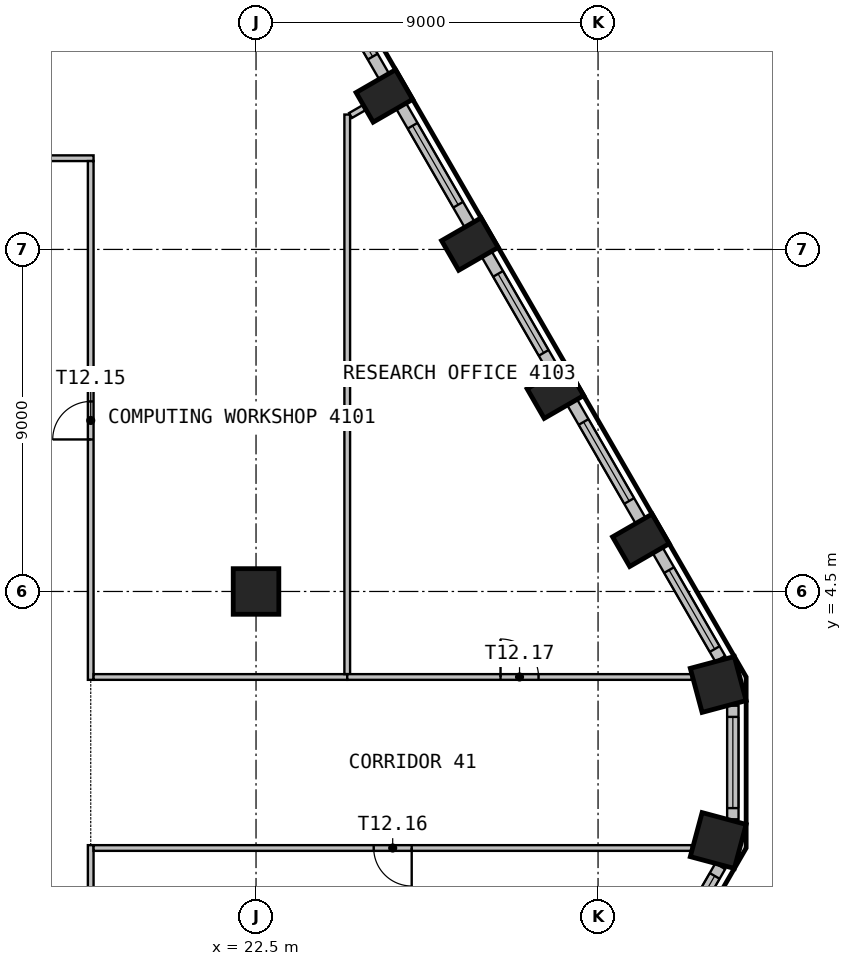
"""IFC4 building model, lengths in metres.
Left out: names, types, materials, properties, quantities, classifications, styles, units other than length and angle.
Written with IfcOpenShell. Run it as: python <this file> out.ifc"""

import sys

from ifc_helpers import new_model, si_unit, direction, frame, frame_2d, origin, origin_2d, place, context, subcontext, project, spatial, rectangle, circle, extrude, element, fill, save


model = new_model("IFC4")
c1 = context("Model", 3, precision=1e-05, world=origin(), true_north=direction((0.0, 1.0)))
c2 = subcontext(c1, "Body", "Model", "MODEL_VIEW")
j1 = project(units=[si_unit("LENGTHUNIT", "METRE"), si_unit("PLANEANGLEUNIT", "RADIAN")], contexts=[c1])
p1 = place(None, origin())
s1 = spatial("IfcSite", under=j1, at=p1, CompositionType="ELEMENT")
p2 = place(p1, origin())
s2 = spatial("IfcBuilding", under=s1, at=p2, CompositionType="ELEMENT")
p3 = place(p2, frame((0.0, 0.0, 167.7)))
s3 = spatial("IfcBuildingStorey", under=s2, at=p3, CompositionType="ELEMENT", Elevation=167.7)
for number, where, z_axis, x_axis in (
    (1, (34.662, -2.053, 0.0), (0.0, 0.0, 1.0), (0.259, 0.966, 0.0)),
    (2, (34.662, 2.053, 0.0), (0.0, 0.0, 1.0), (-0.259, 0.966, 0.0)),
):
    element("IfcColumn", number, at=place(p3, frame(where, z_axis=z_axis, x_axis=x_axis)), inside=s3, PredefinedType="COLUMN", context=c2, shape_type="SweptSolid", body=[
        extrude(rectangle(XDim=1.2, YDim=1.2, at=origin_2d()), origin(), (0.0, 0.0, 1.0), 3.575),
    ])
for number, where, z_axis, x_axis in (
    (3, (32.627, 5.847, 0.0), (0.0, 0.0, 1.0), (-0.5, 0.866, 0.0)),
    (4, (30.377, 9.744, 0.0), (0.0, 0.0, 1.0), (-0.5, 0.866, 0.0)),
    (5, (28.127, 13.641, 0.0), (0.0, 0.0, 1.0), (-0.5, 0.866, 0.0)),
    (6, (25.877, 17.539, 0.0), (0.0, 0.0, 1.0), (-0.5, 0.866, 0.0)),
):
    element("IfcColumn", number, at=place(p3, frame(where, z_axis=z_axis, x_axis=x_axis)), inside=s3, PredefinedType="COLUMN", context=c2, shape_type="SweptSolid", body=[
        extrude(rectangle(XDim=0.9, YDim=1.2, at=origin_2d()), origin(), (0.0, 0.0, 1.0), 3.575),
    ])
p4 = place(p3, frame((22.5, 4.5, 0.0), z_axis=(0.0, 0.0, 1.0), x_axis=(1.0, 0.0, 0.0)))
e7 = element("IfcColumn", 7, at=p4, inside=s3, PredefinedType="COLUMN", context=c2, shape_type="SweptSolid", body=[
    extrude(circle(Radius=0.6, at=origin_2d()), origin(), (0.0, 0.0, 1.0), 3.575),
])
p5 = place(p3, frame((33.069, -5.582, 0.0), z_axis=(0.0, 0.0, 1.0), x_axis=(0.499981217486, 0.866036247602, 0.0)))
e8 = element("IfcWall", 8, at=p5, inside=s3, PredefinedType="SOLIDWALL", context=c2, shape_type="SweptSolid", body=[
    extrude(rectangle(XDim=3.294, YDim=0.3, at=frame_2d((1.647, 0.0))), origin(), (0.0, 0.0, 1.0), 3.575),
])
p6 = place(p5, frame((0.6, 0.0, 0.9)))
e9 = element("IfcOpeningElement", 9, at=p6, cuts=e8, PredefinedType="OPENING", context=c2, shape_type="SweptSolid", body=[
    extrude(rectangle(XDim=2.4, YDim=2.1, at=frame_2d((1.2, 1.05))), frame((0.0, 0.16, 0.0), z_axis=(0.0, -1.0, 0.0), x_axis=(1.0, 0.0, 0.0)), (0.0, 0.0, 1.0), 0.32),
])
p7 = place(p3, frame((35.047, -1.495, 0.0), z_axis=(0.0, 0.0, 1.0), x_axis=(0.0, 1.0, 0.0)))
e10 = element("IfcWall", 10, at=p7, inside=s3, PredefinedType="SOLIDWALL", context=c2, shape_type="SweptSolid", body=[
    extrude(rectangle(XDim=2.989, YDim=0.3, at=frame_2d((1.495, 0.0))), origin(), (0.0, 0.0, 1.0), 3.575),
])
p8 = place(p7, frame((0.295, 0.0, 0.9)))
e11 = element("IfcOpeningElement", 11, at=p8, cuts=e10, PredefinedType="OPENING", context=c2, shape_type="SweptSolid", body=[
    extrude(rectangle(XDim=2.4, YDim=2.1, at=frame_2d((1.2, 1.05))), frame((0.0, 0.16, 0.0), z_axis=(0.0, -1.0, 0.0), x_axis=(1.0, 0.0, 0.0)), (0.0, 0.0, 1.0), 0.32),
])
p9 = place(p3, frame((34.716, 2.729, 0.0), z_axis=(0.0, 0.0, 1.0), x_axis=(-0.499981217486, 0.866036247602, 0.0)))
e12 = element("IfcWall", 12, at=p9, inside=s3, PredefinedType="SOLIDWALL", context=c2, shape_type="SweptSolid", body=[
    extrude(rectangle(XDim=3.294, YDim=0.3, at=frame_2d((1.647, 0.0))), origin(), (0.0, 0.0, 1.0), 3.575),
])
p10 = place(p9, frame((0.295, 0.0, 0.9)))
e13 = element("IfcOpeningElement", 13, at=p10, cuts=e12, PredefinedType="OPENING", context=c2, shape_type="SweptSolid", body=[
    extrude(rectangle(XDim=2.4, YDim=2.1, at=frame_2d((1.2, 1.05))), frame((0.0, 0.16, 0.0), z_axis=(0.0, -1.0, 0.0), x_axis=(1.0, 0.0, 0.0)), (0.0, 0.0, 1.0), 0.32),
])
p11 = place(p3, frame((32.619, 6.362, 0.0), z_axis=(0.0, 0.0, 1.0), x_axis=(-0.500027802648, 0.866009351323, 0.0)))
e14 = element("IfcWall", 14, at=p11, inside=s3, PredefinedType="SOLIDWALL", context=c2, shape_type="SweptSolid", body=[
    extrude(rectangle(XDim=3.599, YDim=0.3, at=frame_2d((1.799, 0.0))), origin(), (0.0, 0.0, 1.0), 3.575),
])
p12 = place(p11, frame((0.6, 0.0, 0.9)))
e15 = element("IfcOpeningElement", 15, at=p12, cuts=e14, PredefinedType="OPENING", context=c2, shape_type="SweptSolid", body=[
    extrude(rectangle(XDim=2.4, YDim=2.1, at=frame_2d((1.2, 1.05))), frame((0.0, 0.16, 0.0), z_axis=(0.0, -1.0, 0.0), x_axis=(1.0, 0.0, 0.0)), (0.0, 0.0, 1.0), 0.32),
])
p13 = place(p3, frame((30.369, 10.26, 0.0), z_axis=(0.0, 0.0, 1.0), x_axis=(-0.500027802648, 0.866009351323, 0.0)))
e16 = element("IfcWall", 16, at=p13, inside=s3, PredefinedType="SOLIDWALL", context=c2, shape_type="SweptSolid", body=[
    extrude(rectangle(XDim=3.599, YDim=0.3, at=frame_2d((1.799, 0.0))), origin(), (0.0, 0.0, 1.0), 3.575),
])
p14 = place(p13, frame((0.6, 0.0, 0.9)))
e17 = element("IfcOpeningElement", 17, at=p14, cuts=e16, PredefinedType="OPENING", context=c2, shape_type="SweptSolid", body=[
    extrude(rectangle(XDim=2.4, YDim=2.1, at=frame_2d((1.2, 1.05))), frame((0.0, 0.16, 0.0), z_axis=(0.0, -1.0, 0.0), x_axis=(1.0, 0.0, 0.0)), (0.0, 0.0, 1.0), 0.32),
])
p15 = place(p3, frame((28.119, 14.156, 0.0), z_axis=(0.0, 0.0, 1.0), x_axis=(-0.500027802648, 0.866009351323, 0.0)))
e18 = element("IfcWall", 18, at=p15, inside=s3, PredefinedType="SOLIDWALL", context=c2, shape_type="SweptSolid", body=[
    extrude(rectangle(XDim=3.599, YDim=0.3, at=frame_2d((1.799, 0.0))), origin(), (0.0, 0.0, 1.0), 3.575),
])
p16 = place(p15, frame((0.6, 0.0, 0.9)))
e19 = element("IfcOpeningElement", 19, at=p16, cuts=e18, PredefinedType="OPENING", context=c2, shape_type="SweptSolid", body=[
    extrude(rectangle(XDim=2.4, YDim=2.1, at=frame_2d((1.2, 1.05))), frame((0.0, 0.16, 0.0), z_axis=(0.0, -1.0, 0.0), x_axis=(1.0, 0.0, 0.0)), (0.0, 0.0, 1.0), 0.32),
])
p17 = place(p3, frame((25.869, 18.054, 0.0), z_axis=(0.0, 0.0, 1.0), x_axis=(-0.500027802648, 0.866009351323, 0.0)))
e20 = element("IfcWall", 20, at=p17, inside=s3, PredefinedType="SOLIDWALL", context=c2, shape_type="SweptSolid", body=[
    extrude(rectangle(XDim=3.599, YDim=0.3, at=frame_2d((1.799, 0.0))), origin(), (0.0, 0.0, 1.0), 3.575),
])
p18 = place(p17, frame((0.6, 0.0, 0.9)))
e21 = element("IfcOpeningElement", 21, at=p18, cuts=e20, PredefinedType="OPENING", context=c2, shape_type="SweptSolid", body=[
    extrude(rectangle(XDim=2.4, YDim=2.1, at=frame_2d((1.2, 1.05))), frame((0.0, 0.16, 0.0), z_axis=(0.0, -1.0, 0.0), x_axis=(1.0, 0.0, 0.0)), (0.0, 0.0, 1.0), 0.32),
])
p19 = place(p3, frame((18.225, 15.9, 0.0), z_axis=(0.0, 0.0, 1.0), x_axis=(-1.0, 0.0, 0.0)))
e22 = element("IfcWall", 22, at=p19, inside=s3, PredefinedType="PARTITIONING", context=c2, shape_type="SweptSolid", body=[
    extrude(rectangle(XDim=4.725, YDim=0.15, at=frame_2d((2.363, 0.0))), origin(), (0.0, 0.0, 1.0), 3.575),
])
p20 = place(p3, frame((18.15, -15.825, 0.0), z_axis=(0.0, 0.0, 1.0), x_axis=(0.0, 1.0, 0.0)))
e23 = element("IfcWall", 23, at=p20, inside=s3, PredefinedType="PARTITIONING", context=c2, shape_type="SweptSolid", body=[
    extrude(rectangle(XDim=13.65, YDim=0.15, at=frame_2d((6.825, 0.0))), origin(), (0.0, 0.0, 1.0), 3.575),
])
p21 = place(p3, frame((33.968, -2.25, 0.0), z_axis=(0.0, 0.0, 1.0), x_axis=(-1.0, 0.0, 0.0)))
e24 = element("IfcWall", 24, at=p21, inside=s3, PredefinedType="PARTITIONING", context=c2, shape_type="SweptSolid", body=[
    extrude(rectangle(XDim=15.743, YDim=0.15, at=frame_2d((7.871, 0.0))), origin(), (0.0, 0.0, 1.0), 3.575),
])
p22 = place(p21, frame((7.371, 0.0, 0.0)))
e25 = element("IfcOpeningElement", 25, at=p22, cuts=e24, PredefinedType="OPENING", context=c2, shape_type="SweptSolid", body=[
    extrude(rectangle(XDim=1.0, YDim=2.1, at=frame_2d((0.5, 1.05))), frame((0.0, 0.085, 0.0), z_axis=(0.0, -1.0, 0.0), x_axis=(1.0, 0.0, 0.0)), (0.0, 0.0, 1.0), 0.17),
])
p23 = place(p3, frame((18.15, 2.175, 0.0), z_axis=(0.0, 0.0, 1.0), x_axis=(0.0, 1.0, 0.0)))
e26 = element("IfcWall", 26, at=p23, inside=s3, PredefinedType="PARTITIONING", context=c2, shape_type="SweptSolid", body=[
    extrude(rectangle(XDim=13.65, YDim=0.15, at=frame_2d((6.825, 0.0))), origin(), (0.0, 0.0, 1.0), 3.575),
])
p24 = place(p23, frame((6.325, 0.0, 0.0)))
e27 = element("IfcOpeningElement", 27, at=p24, cuts=e26, PredefinedType="OPENING", context=c2, shape_type="SweptSolid", body=[
    extrude(rectangle(XDim=1.0, YDim=2.1, at=frame_2d((0.5, 1.05))), frame((0.0, 0.085, 0.0), z_axis=(0.0, -1.0, 0.0), x_axis=(1.0, 0.0, 0.0)), (0.0, 0.0, 1.0), 0.17),
])
p25 = place(p3, frame((18.225, 2.25, 0.0), z_axis=(0.0, 0.0, 1.0), x_axis=(1.0, 0.0, 0.0)))
e28 = element("IfcWall", 28, at=p25, inside=s3, PredefinedType="PARTITIONING", context=c2, shape_type="SweptSolid", body=[
    extrude(rectangle(XDim=6.675, YDim=0.15, at=frame_2d((3.337, 0.0))), origin(), (0.0, 0.0, 1.0), 3.575),
])
p26 = place(p3, frame((24.9, 17.049, 0.0), z_axis=(0.0, 0.0, 1.0), x_axis=(0.0, -1.0, 0.0)))
e29 = element("IfcWall", 29, at=p26, inside=s3, PredefinedType="PARTITIONING", context=c2, shape_type="SweptSolid", body=[
    extrude(rectangle(XDim=14.724, YDim=0.15, at=frame_2d((7.362, 0.0))), origin(), (0.0, 0.0, 1.0), 3.575),
])
p27 = place(p3, frame((24.9, 2.25, 0.0), z_axis=(0.0, 0.0, 1.0), x_axis=(1.0, 0.0, 0.0)))
e30 = element("IfcWall", 30, at=p27, inside=s3, PredefinedType="PARTITIONING", context=c2, shape_type="SweptSolid", body=[
    extrude(rectangle(XDim=9.068, YDim=0.15, at=frame_2d((4.534, 0.0))), origin(), (0.0, 0.0, 1.0), 3.575),
])
p28 = place(p27, frame((4.034, 0.0, 0.0)))
e31 = element("IfcOpeningElement", 31, at=p28, cuts=e30, PredefinedType="OPENING", context=c2, shape_type="SweptSolid", body=[
    extrude(rectangle(XDim=1.0, YDim=2.1, at=frame_2d((0.5, 1.05))), frame((0.0, 0.085, 0.0), z_axis=(0.0, -1.0, 0.0), x_axis=(1.0, 0.0, 0.0)), (0.0, 0.0, 1.0), 0.17),
])
p29 = place(p3, frame((25.341, 17.228, 0.0), z_axis=(0.0, 0.0, 1.0), x_axis=(-0.866066236526, -0.499929268946, 0.0)))
e32 = element("IfcWall", 32, at=p29, inside=s3, PredefinedType="PARTITIONING", context=c2, shape_type="SweptSolid", body=[
    extrude(rectangle(XDim=0.409, YDim=0.15, at=frame_2d((0.204, 0.0))), origin(), (0.0, 0.0, 1.0), 3.575),
])
p30 = place(p6, origin())
e33 = element("IfcWindow", 33, at=p30, inside=s3, PartitioningType="SINGLE_PANEL", PredefinedType="WINDOW", context=c2, shape_type="SweptSolid", body=[
    extrude(rectangle(XDim=2.4, YDim=2.1, at=frame_2d((1.2, 1.05))), frame((0.0, 0.03, 0.0), z_axis=(0.0, -1.0, 0.0), x_axis=(1.0, 0.0, 0.0)), (0.0, 0.0, 1.0), 0.06),
])
fill(e9, e33)
p31 = place(p8, origin())
e34 = element("IfcWindow", 34, at=p31, inside=s3, PartitioningType="SINGLE_PANEL", PredefinedType="WINDOW", context=c2, shape_type="SweptSolid", body=[
    extrude(rectangle(XDim=2.4, YDim=2.1, at=frame_2d((1.2, 1.05))), frame((0.0, 0.03, 0.0), z_axis=(0.0, -1.0, 0.0), x_axis=(1.0, 0.0, 0.0)), (0.0, 0.0, 1.0), 0.06),
])
fill(e11, e34)
p32 = place(p10, origin())
e35 = element("IfcWindow", 35, at=p32, inside=s3, PartitioningType="SINGLE_PANEL", PredefinedType="WINDOW", context=c2, shape_type="SweptSolid", body=[
    extrude(rectangle(XDim=2.4, YDim=2.1, at=frame_2d((1.2, 1.05))), frame((0.0, 0.03, 0.0), z_axis=(0.0, -1.0, 0.0), x_axis=(1.0, 0.0, 0.0)), (0.0, 0.0, 1.0), 0.06),
])
fill(e13, e35)
p33 = place(p12, origin())
e36 = element("IfcWindow", 36, at=p33, inside=s3, PartitioningType="SINGLE_PANEL", PredefinedType="WINDOW", context=c2, shape_type="SweptSolid", body=[
    extrude(rectangle(XDim=2.4, YDim=2.1, at=frame_2d((1.2, 1.05))), frame((0.0, 0.03, 0.0), z_axis=(0.0, -1.0, 0.0), x_axis=(1.0, 0.0, 0.0)), (0.0, 0.0, 1.0), 0.06),
])
fill(e15, e36)
p34 = place(p14, origin())
e37 = element("IfcWindow", 37, at=p34, inside=s3, PartitioningType="SINGLE_PANEL", PredefinedType="WINDOW", context=c2, shape_type="SweptSolid", body=[
    extrude(rectangle(XDim=2.4, YDim=2.1, at=frame_2d((1.2, 1.05))), frame((0.0, 0.03, 0.0), z_axis=(0.0, -1.0, 0.0), x_axis=(1.0, 0.0, 0.0)), (0.0, 0.0, 1.0), 0.06),
])
fill(e17, e37)
p35 = place(p16, origin())
e38 = element("IfcWindow", 38, at=p35, inside=s3, PartitioningType="SINGLE_PANEL", PredefinedType="WINDOW", context=c2, shape_type="SweptSolid", body=[
    extrude(rectangle(XDim=2.4, YDim=2.1, at=frame_2d((1.2, 1.05))), frame((0.0, 0.03, 0.0), z_axis=(0.0, -1.0, 0.0), x_axis=(1.0, 0.0, 0.0)), (0.0, 0.0, 1.0), 0.06),
])
fill(e19, e38)
p36 = place(p18, origin())
e39 = element("IfcWindow", 39, at=p36, inside=s3, PartitioningType="SINGLE_PANEL", PredefinedType="WINDOW", context=c2, shape_type="SweptSolid", body=[
    extrude(rectangle(XDim=2.4, YDim=2.1, at=frame_2d((1.2, 1.05))), frame((0.0, 0.03, 0.0), z_axis=(0.0, -1.0, 0.0), x_axis=(1.0, 0.0, 0.0)), (0.0, 0.0, 1.0), 0.06),
])
fill(e21, e39)
p37 = place(p24, origin())
e40 = element("IfcDoor", 40, at=p37, inside=s3, OperationType="SINGLE_SWING_RIGHT", PredefinedType="DOOR", context=c2, shape_type="SweptSolid", body=[
    extrude(rectangle(XDim=1.0, YDim=2.1, at=frame_2d((0.5, 1.05))), frame((0.0, 0.025, 0.0), z_axis=(0.0, -1.0, 0.0), x_axis=(1.0, 0.0, 0.0)), (0.0, 0.0, 1.0), 0.05),
])
fill(e27, e40)
p38 = place(p22, origin())
e41 = element("IfcDoor", 41, at=p38, inside=s3, OperationType="SINGLE_SWING_LEFT", PredefinedType="DOOR", context=c2, shape_type="SweptSolid", body=[
    extrude(rectangle(XDim=1.0, YDim=2.1, at=frame_2d((0.5, 1.05))), frame((0.0, 0.025, 0.0), z_axis=(0.0, -1.0, 0.0), x_axis=(1.0, 0.0, 0.0)), (0.0, 0.0, 1.0), 0.05),
])
fill(e25, e41)
p39 = place(p28, origin())
e42 = element("IfcDoor", 42, at=p39, inside=s3, OperationType="SINGLE_SWING_RIGHT", PredefinedType="DOOR", context=c2, shape_type="SweptSolid", body=[
    extrude(rectangle(XDim=1.0, YDim=2.1, at=frame_2d((0.5, 1.05))), frame((0.0, 0.025, 0.0), z_axis=(0.0, -1.0, 0.0), x_axis=(1.0, 0.0, 0.0)), (0.0, 0.0, 1.0), 0.05),
])
fill(e31, e42)
save(model, sys.argv[1])
